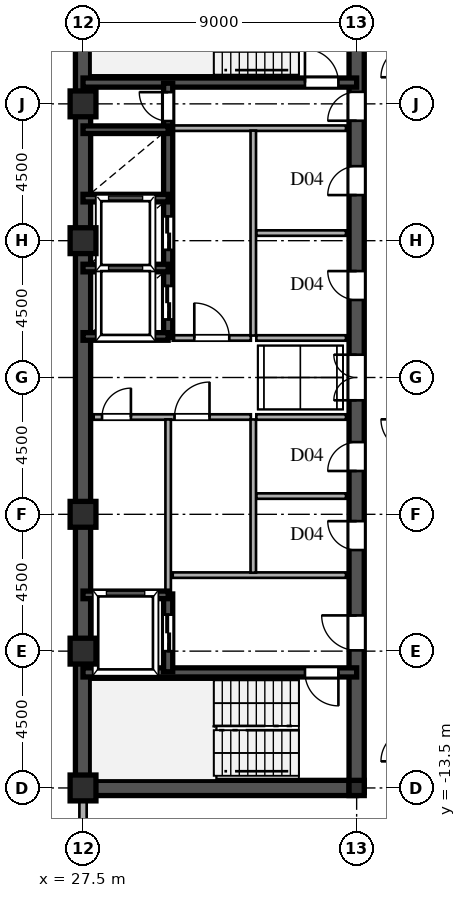
"""IFC4 building model, lengths in metres.
Left out: names, types, materials, properties, quantities, classifications, styles, units other than length and angle.
Written with IfcOpenShell. Run it as: python <this file> out.ifc"""

import sys

from ifc_helpers import new_model, si_unit, direction, frame, frame_2d, origin, origin_2d, place, context, subcontext, project, spatial, rectangle, hollow_rectangle, i_section, extrude, source, transform, mapped, element, fill, save


model = new_model("IFC4")
c1 = context("Model", 3, precision=1e-05, world=origin(), true_north=direction((0.0, 1.0)))
c2 = subcontext(c1, "Body", "Model", "MODEL_VIEW")
j1 = project(units=[si_unit("LENGTHUNIT", "METRE"), si_unit("PLANEANGLEUNIT", "RADIAN")], contexts=[c1])
p1 = place(None, origin())
s1 = spatial("IfcSite", under=j1, at=p1, CompositionType="ELEMENT")
p2 = place(p1, origin())
s2 = spatial("IfcBuilding", under=s1, at=p2, CompositionType="ELEMENT")
p3 = place(p2, frame((0.0, 0.0, 221.1)))
s3 = spatial("IfcBuildingStorey", under=s2, at=p3, CompositionType="ELEMENT", Elevation=221.1)
m1 = source(origin(), c2, "Body", "SweptSolid", [
    extrude(hollow_rectangle(XDim=0.85, YDim=0.85, WallThickness=0.036, at=origin_2d()), origin(), (0.0, 0.0, 1.0), 3.6),
])
for number, where, z_axis, x_axis in (
    (1, (27.5, -13.5, 0.0), (0.0, 0.0, 1.0), (1.0, 0.0, 0.0)),
    (2, (27.5, -9.0, 0.0), (0.0, 0.0, 1.0), (1.0, 0.0, 0.0)),
    (3, (27.5, -4.5, 0.0), (0.0, 0.0, 1.0), (1.0, 0.0, 0.0)),
    (4, (27.5, 4.5, 0.0), (0.0, 0.0, 1.0), (1.0, 0.0, 0.0)),
    (5, (27.5, 9.0, 0.0), (0.0, 0.0, 1.0), (1.0, 0.0, 0.0)),
):
    element("IfcColumn", number, at=place(p3, frame(where, z_axis=z_axis, x_axis=x_axis)), inside=s3, PredefinedType="COLUMN", context=c2, shape_type="MappedRepresentation", body=[
        mapped(m1, transform((0.0, 0.0, 0.0), scale=1.0)),
    ])
m2 = source(origin(), c2, "Body", "SweptSolid", [
    extrude(i_section(OverallWidth=0.5, OverallDepth=0.5, WebThickness=0.02, FlangeThickness=0.032, at=origin_2d()), origin(), (0.0, 0.0, 1.0), 3.6),
])
p4 = place(p3, frame((36.5, -13.5, 0.0), z_axis=(0.0, 0.0, 1.0), x_axis=(1.0, 0.0, 0.0)))
e6 = element("IfcColumn", 6, at=p4, inside=s3, PredefinedType="COLUMN", context=c2, shape_type="MappedRepresentation", body=[
    mapped(m2, transform((0.0, 0.0, 0.0), scale=1.0)),
])
p5 = place(p3, frame((27.5, -15.98, 0.0), z_axis=(0.0, 0.0, 1.0), x_axis=(0.0, 1.0, 0.0)))
e7 = element("IfcWall", 7, at=p5, inside=s3, PredefinedType="SOLIDWALL", context=c2, shape_type="SweptSolid", body=[
    extrude(rectangle(XDim=1.605, YDim=0.24, at=frame_2d((0.803, 0.0))), origin(), (0.0, 0.0, 1.0), 3.34),
])
p6 = place(p3, frame((27.5, -14.375, 0.0), z_axis=(0.0, 0.0, 1.0), x_axis=(0.0, 1.0, 0.0)))
e8 = element("IfcWall", 8, at=p6, inside=s3, PredefinedType="SOLIDWALL", context=c2, shape_type="SweptSolid", body=[
    extrude(rectangle(XDim=0.62, YDim=0.24, at=frame_2d((0.31, 0.0))), origin(), (0.0, 0.0, 1.0), 2.84),
])
for number, where, z_axis, x_axis in (
    (9, (27.5, -13.5, 0.0), (0.0, 0.0, 1.0), (0.0, 1.0, 0.0)),
    (10, (27.5, 1.3, 0.0), (0.0, 0.0, 1.0), (0.0, 1.0, 0.0)),
):
    element("IfcWall", number, at=place(p3, frame(where, z_axis=z_axis, x_axis=x_axis)), inside=s3, PredefinedType="SHEAR", context=c2, shape_type="SweptSolid", body=[
        extrude(rectangle(XDim=12.2, YDim=0.5, at=frame_2d((6.1, 0.0))), origin(), (0.0, 0.0, 1.0), 3.34),
    ])
p7 = place(p3, frame((27.5, -1.3, 0.0), z_axis=(0.0, 0.0, 1.0), x_axis=(0.0, 1.0, 0.0)))
e11 = element("IfcWall", 11, at=p7, inside=s3, PredefinedType="SHEAR", context=c2, shape_type="SweptSolid", body=[
    extrude(rectangle(XDim=2.6, YDim=0.5, at=frame_2d((1.3, 0.0))), origin(), (0.0, 0.0, 1.0), 3.34),
])
p8 = place(p3, frame((27.5, -13.5, 0.0), z_axis=(0.0, 0.0, 1.0), x_axis=(1.0, 0.0, 0.0)))
e12 = element("IfcWall", 12, at=p8, inside=s3, PredefinedType="SHEAR", context=c2, shape_type="SweptSolid", body=[
    extrude(rectangle(XDim=9.0, YDim=0.5, at=frame_2d((4.5, 0.0))), origin(), (0.0, 0.0, 1.0), 3.34),
])
p9 = place(p3, frame((36.5, -13.65, 0.0), z_axis=(0.0, 0.0, 1.0), x_axis=(0.0, 1.0, 0.0)))
e13 = element("IfcWall", 13, at=p9, inside=s3, PredefinedType="SHEAR", context=c2, shape_type="SweptSolid", body=[
    extrude(rectangle(XDim=7.15, YDim=0.5, at=frame_2d((3.575, 0.0))), origin(), (0.0, 0.0, 1.0), 3.34),
])
p10 = place(p9, frame((4.675, 0.0, 0.0)))
e14 = element("IfcOpeningElement", 14, at=p10, cuts=e13, PredefinedType="OPENING", context=c2, shape_type="SweptSolid", body=[
    extrude(rectangle(XDim=1.15, YDim=2.2, at=frame_2d((0.575, 1.1))), frame((0.0, 0.26, 0.0), z_axis=(0.0, -1.0, 0.0), x_axis=(1.0, 0.0, 0.0)), (0.0, 0.0, 1.0), 0.52),
])
p11 = place(p3, frame((36.5, -1.3, 0.0), z_axis=(0.0, 0.0, 1.0), x_axis=(0.0, 1.0, 0.0)))
e15 = element("IfcWall", 15, at=p11, inside=s3, PredefinedType="SHEAR", context=c2, shape_type="SweptSolid", body=[
    extrude(rectangle(XDim=2.6, YDim=0.5, at=frame_2d((1.3, 0.0))), origin(), (0.0, 0.0, 1.0), 3.34),
])
p12 = place(p11, frame((0.55, 0.0, 0.0)))
e16 = element("IfcOpeningElement", 16, at=p12, cuts=e15, PredefinedType="OPENING", context=c2, shape_type="SweptSolid", body=[
    extrude(rectangle(XDim=1.5, YDim=2.3, at=frame_2d((0.75, 1.15))), frame((0.0, 0.26, 0.0), z_axis=(0.0, -1.0, 0.0), x_axis=(1.0, 0.0, 0.0)), (0.0, 0.0, 1.0), 0.52),
])
p13 = place(p3, frame((36.5, 8.2, 0.0), z_axis=(0.0, 0.0, 1.0), x_axis=(0.0, 1.0, 0.0)))
e17 = element("IfcWall", 17, at=p13, inside=s3, PredefinedType="SHEAR", context=c2, shape_type="SweptSolid", body=[
    extrude(rectangle(XDim=5.45, YDim=0.5, at=frame_2d((2.725, 0.0))), origin(), (0.0, 0.0, 1.0), 3.34),
])
p14 = place(p13, frame((0.245, 0.0, 0.0)))
e18 = element("IfcOpeningElement", 18, at=p14, cuts=e17, PredefinedType="OPENING", context=c2, shape_type="SweptSolid", body=[
    extrude(rectangle(XDim=0.95, YDim=2.15, at=frame_2d((0.475, 1.075))), frame((0.0, 0.26, 0.0), z_axis=(0.0, -1.0, 0.0), x_axis=(1.0, 0.0, 0.0)), (0.0, 0.0, 1.0), 0.52),
])
p15 = place(p3, frame((36.5, -6.5, 0.0), z_axis=(0.0, 0.0, 1.0), x_axis=(0.0, 1.0, 0.0)))
e19 = element("IfcWall", 19, at=p15, inside=s3, PredefinedType="SHEAR", context=c2, shape_type="SweptSolid", body=[
    extrude(rectangle(XDim=2.6, YDim=0.5, at=frame_2d((1.3, 0.0))), origin(), (0.0, 0.0, 1.0), 3.34),
])
p16 = place(p15, frame((0.825, 0.0, 0.0)))
e20 = element("IfcOpeningElement", 20, at=p16, cuts=e19, PredefinedType="OPENING", context=c2, shape_type="SweptSolid", body=[
    extrude(rectangle(XDim=0.95, YDim=2.15, at=frame_2d((0.475, 1.075))), frame((0.0, 0.26, 0.0), z_axis=(0.0, -1.0, 0.0), x_axis=(1.0, 0.0, 0.0)), (0.0, 0.0, 1.0), 0.52),
])
p17 = place(p3, frame((36.5, -3.9, 0.0), z_axis=(0.0, 0.0, 1.0), x_axis=(0.0, 1.0, 0.0)))
e21 = element("IfcWall", 21, at=p17, inside=s3, PredefinedType="SHEAR", context=c2, shape_type="SweptSolid", body=[
    extrude(rectangle(XDim=2.6, YDim=0.5, at=frame_2d((1.3, 0.0))), origin(), (0.0, 0.0, 1.0), 3.34),
])
p18 = place(p17, frame((0.825, 0.0, 0.0)))
e22 = element("IfcOpeningElement", 22, at=p18, cuts=e21, PredefinedType="OPENING", context=c2, shape_type="SweptSolid", body=[
    extrude(rectangle(XDim=0.95, YDim=2.15, at=frame_2d((0.475, 1.075))), frame((0.0, 0.26, 0.0), z_axis=(0.0, -1.0, 0.0), x_axis=(1.0, 0.0, 0.0)), (0.0, 0.0, 1.0), 0.52),
])
p19 = place(p3, frame((36.5, 1.3, 0.0), z_axis=(0.0, 0.0, 1.0), x_axis=(0.0, 1.0, 0.0)))
e23 = element("IfcWall", 23, at=p19, inside=s3, PredefinedType="SHEAR", context=c2, shape_type="SweptSolid", body=[
    extrude(rectangle(XDim=3.45, YDim=0.5, at=frame_2d((1.725, 0.0))), origin(), (0.0, 0.0, 1.0), 3.34),
])
p20 = place(p19, frame((1.25, 0.0, 0.0)))
e24 = element("IfcOpeningElement", 24, at=p20, cuts=e23, PredefinedType="OPENING", context=c2, shape_type="SweptSolid", body=[
    extrude(rectangle(XDim=0.95, YDim=2.15, at=frame_2d((0.475, 1.075))), frame((0.0, 0.26, 0.0), z_axis=(0.0, -1.0, 0.0), x_axis=(1.0, 0.0, 0.0)), (0.0, 0.0, 1.0), 0.52),
])
p21 = place(p3, frame((36.5, 4.75, 0.0), z_axis=(0.0, 0.0, 1.0), x_axis=(0.0, 1.0, 0.0)))
e25 = element("IfcWall", 25, at=p21, inside=s3, PredefinedType="SHEAR", context=c2, shape_type="SweptSolid", body=[
    extrude(rectangle(XDim=3.45, YDim=0.5, at=frame_2d((1.725, 0.0))), origin(), (0.0, 0.0, 1.0), 3.34),
])
p22 = place(p21, frame((1.25, 0.0, 0.0)))
e26 = element("IfcOpeningElement", 26, at=p22, cuts=e25, PredefinedType="OPENING", context=c2, shape_type="SweptSolid", body=[
    extrude(rectangle(XDim=0.95, YDim=2.15, at=frame_2d((0.475, 1.075))), frame((0.0, 0.26, 0.0), z_axis=(0.0, -1.0, 0.0), x_axis=(1.0, 0.0, 0.0)), (0.0, 0.0, 1.0), 0.52),
])
p23 = place(p3, frame((27.5, -9.7, 0.0), z_axis=(0.0, 0.0, 1.0), x_axis=(1.0, 0.0, 0.0)))
e27 = element("IfcWall", 27, at=p23, inside=s3, PredefinedType="SHEAR", context=c2, shape_type="SweptSolid", body=[
    extrude(rectangle(XDim=9.0, YDim=0.3, at=frame_2d((4.5, 0.0))), origin(), (0.0, 0.0, 1.0), 3.34),
])
p24 = place(p23, frame((7.3, 0.0, 0.0)))
e28 = element("IfcOpeningElement", 28, at=p24, cuts=e27, PredefinedType="OPENING", context=c2, shape_type="SweptSolid", body=[
    extrude(rectangle(XDim=1.1, YDim=2.2, at=frame_2d((0.55, 1.1))), frame((0.0, 0.16, 0.0), z_axis=(0.0, -1.0, 0.0), x_axis=(1.0, 0.0, 0.0)), (0.0, 0.0, 1.0), 0.32),
])
p25 = place(p3, frame((27.5, 9.7, 0.0), z_axis=(0.0, 0.0, 1.0), x_axis=(1.0, 0.0, 0.0)))
e29 = element("IfcWall", 29, at=p25, inside=s3, PredefinedType="SHEAR", context=c2, shape_type="SweptSolid", body=[
    extrude(rectangle(XDim=9.0, YDim=0.3, at=frame_2d((4.5, 0.0))), origin(), (0.0, 0.0, 1.0), 3.34),
])
p26 = place(p25, frame((7.3, 0.0, 0.0)))
e30 = element("IfcOpeningElement", 30, at=p26, cuts=e29, PredefinedType="OPENING", context=c2, shape_type="SweptSolid", body=[
    extrude(rectangle(XDim=1.1, YDim=2.2, at=frame_2d((0.55, 1.1))), frame((0.0, 0.16, 0.0), z_axis=(0.0, -1.0, 0.0), x_axis=(1.0, 0.0, 0.0)), (0.0, 0.0, 1.0), 0.32),
])
for number, where, z_axis, x_axis in (
    (31, (27.5, -7.15, 0.0), (0.0, 0.0, 1.0), (1.0, 0.0, 0.0)),
    (32, (27.5, 1.35, 0.0), (0.0, 0.0, 1.0), (1.0, 0.0, 0.0)),
    (33, (27.5, 3.6, 0.0), (0.0, 0.0, 1.0), (1.0, 0.0, 0.0)),
    (34, (27.5, 5.9, 0.0), (0.0, 0.0, 1.0), (1.0, 0.0, 0.0)),
    (35, (27.5, 8.15, 0.0), (0.0, 0.0, 1.0), (1.0, 0.0, 0.0)),
):
    element("IfcWall", number, at=place(p3, frame(where, z_axis=z_axis, x_axis=x_axis)), inside=s3, PredefinedType="SHEAR", context=c2, shape_type="SweptSolid", body=[
        extrude(rectangle(XDim=2.8, YDim=0.25, at=frame_2d((1.4, 0.0))), origin(), (0.0, 0.0, 1.0), 3.34),
    ])
p27 = place(p3, frame((30.3, -9.68, 0.0), z_axis=(0.0, 0.0, 1.0), x_axis=(0.0, 1.0, 0.0)))
e36 = element("IfcWall", 36, at=p27, inside=s3, PredefinedType="SHEAR", context=c2, shape_type="SweptSolid", body=[
    extrude(rectangle(XDim=2.56, YDim=0.3, at=frame_2d((1.28, 0.0))), origin(), (0.0, 0.0, 1.0), 3.34),
])
p28 = place(p27, frame((0.68, 0.0, 0.0)))
e37 = element("IfcOpeningElement", 37, at=p28, cuts=e36, PredefinedType="OPENING", context=c2, shape_type="SweptSolid", body=[
    extrude(rectangle(XDim=1.2, YDim=2.25, at=frame_2d((0.6, 1.125))), frame((0.0, 0.16, 0.0), z_axis=(0.0, -1.0, 0.0), x_axis=(1.0, 0.0, 0.0)), (0.0, 0.0, 1.0), 0.32),
])
p29 = place(p3, frame((30.3, 1.32, 0.0), z_axis=(0.0, 0.0, 1.0), x_axis=(0.0, 1.0, 0.0)))
e38 = element("IfcWall", 38, at=p29, inside=s3, PredefinedType="SHEAR", context=c2, shape_type="SweptSolid", body=[
    extrude(rectangle(XDim=2.28, YDim=0.3, at=frame_2d((1.14, 0.0))), origin(), (0.0, 0.0, 1.0), 3.34),
])
p30 = place(p29, frame((0.59, 0.0, 0.0)))
e39 = element("IfcOpeningElement", 39, at=p30, cuts=e38, PredefinedType="OPENING", context=c2, shape_type="SweptSolid", body=[
    extrude(rectangle(XDim=1.1, YDim=2.2, at=frame_2d((0.55, 1.1))), frame((0.0, 0.16, 0.0), z_axis=(0.0, -1.0, 0.0), x_axis=(1.0, 0.0, 0.0)), (0.0, 0.0, 1.0), 0.32),
])
p31 = place(p3, frame((30.3, 3.6, 0.0), z_axis=(0.0, 0.0, 1.0), x_axis=(0.0, 1.0, 0.0)))
e40 = element("IfcWall", 40, at=p31, inside=s3, PredefinedType="SHEAR", context=c2, shape_type="SweptSolid", body=[
    extrude(rectangle(XDim=2.3, YDim=0.3, at=frame_2d((1.15, 0.0))), origin(), (0.0, 0.0, 1.0), 3.34),
])
p32 = place(p31, frame((0.6, 0.0, 0.0)))
e41 = element("IfcOpeningElement", 41, at=p32, cuts=e40, PredefinedType="OPENING", context=c2, shape_type="SweptSolid", body=[
    extrude(rectangle(XDim=1.1, YDim=2.2, at=frame_2d((0.55, 1.1))), frame((0.0, 0.16, 0.0), z_axis=(0.0, -1.0, 0.0), x_axis=(1.0, 0.0, 0.0)), (0.0, 0.0, 1.0), 0.32),
])
p33 = place(p3, frame((30.3, 5.9, 0.0), z_axis=(0.0, 0.0, 1.0), x_axis=(0.0, 1.0, 0.0)))
e42 = element("IfcWall", 42, at=p33, inside=s3, PredefinedType="SHEAR", context=c2, shape_type="SweptSolid", body=[
    extrude(rectangle(XDim=2.25, YDim=0.3, at=frame_2d((1.125, 0.0))), origin(), (0.0, 0.0, 1.0), 3.34),
])
p34 = place(p3, frame((30.3, 8.15, 0.0), z_axis=(0.0, 0.0, 1.0), x_axis=(0.0, 1.0, 0.0)))
e43 = element("IfcWall", 43, at=p34, inside=s3, PredefinedType="SHEAR", context=c2, shape_type="SweptSolid", body=[
    extrude(rectangle(XDim=1.53, YDim=0.3, at=frame_2d((0.765, 0.0))), origin(), (0.0, 0.0, 1.0), 3.34),
])
p35 = place(p34, frame((0.285, 0.0, 0.0)))
e44 = element("IfcOpeningElement", 44, at=p35, cuts=e43, PredefinedType="OPENING", context=c2, shape_type="SweptSolid", body=[
    extrude(rectangle(XDim=0.95, YDim=2.15, at=frame_2d((0.475, 1.075))), frame((0.0, 0.16, 0.0), z_axis=(0.0, -1.0, 0.0), x_axis=(1.0, 0.0, 0.0)), (0.0, 0.0, 1.0), 0.32),
])
for number, where, z_axis, x_axis in (
    (45, (30.45, -6.5, 0.0), (0.0, 0.0, 1.0), (1.0, 0.0, 0.0)),
    (46, (30.45, 8.2, 0.0), (0.0, 0.0, 1.0), (1.0, 0.0, 0.0)),
):
    element("IfcWall", number, at=place(p3, frame(where, z_axis=z_axis, x_axis=x_axis)), inside=s3, PredefinedType="PARTITIONING", context=c2, shape_type="SweptSolid", body=[
        extrude(rectangle(XDim=5.7, YDim=0.18, at=frame_2d((2.85, 0.0))), origin(), (0.0, 0.0, 1.0), 3.34),
    ])
p36 = place(p3, frame((33.1, -6.42, 0.0), z_axis=(0.0, 0.0, 1.0), x_axis=(0.0, 1.0, 0.0)))
e47 = element("IfcWall", 47, at=p36, inside=s3, PredefinedType="PARTITIONING", context=c2, shape_type="SweptSolid", body=[
    extrude(rectangle(XDim=5.04, YDim=0.18, at=frame_2d((2.52, 0.0))), origin(), (0.0, 0.0, 1.0), 3.34),
])
p37 = place(p3, frame((33.1, 1.38, 0.0), z_axis=(0.0, 0.0, 1.0), x_axis=(0.0, 1.0, 0.0)))
e48 = element("IfcWall", 48, at=p37, inside=s3, PredefinedType="PARTITIONING", context=c2, shape_type="SweptSolid", body=[
    extrude(rectangle(XDim=6.74, YDim=0.18, at=frame_2d((3.37, 0.0))), origin(), (0.0, 0.0, 1.0), 3.34),
])
p38 = place(p3, frame((27.85, -1.3, 0.0), z_axis=(0.0, 0.0, 1.0), x_axis=(1.0, 0.0, 0.0)))
e49 = element("IfcWall", 49, at=p38, inside=s3, PredefinedType="PARTITIONING", context=c2, shape_type="SweptSolid", body=[
    extrude(rectangle(XDim=2.45, YDim=0.18, at=frame_2d((1.225, 0.0))), origin(), (0.0, 0.0, 1.0), 3.34),
])
p39 = place(p38, frame((0.275, 0.0, 0.0)))
e50 = element("IfcOpeningElement", 50, at=p39, cuts=e49, PredefinedType="OPENING", context=c2, shape_type="SweptSolid", body=[
    extrude(rectangle(XDim=0.95, YDim=2.15, at=frame_2d((0.475, 1.075))), frame((0.0, 0.1, 0.0), z_axis=(0.0, -1.0, 0.0), x_axis=(1.0, 0.0, 0.0)), (0.0, 0.0, 1.0), 0.2),
])
p40 = place(p3, frame((30.3, -1.3, 0.0), z_axis=(0.0, 0.0, 1.0), x_axis=(1.0, 0.0, 0.0)))
e51 = element("IfcWall", 51, at=p40, inside=s3, PredefinedType="PARTITIONING", context=c2, shape_type="SweptSolid", body=[
    extrude(rectangle(XDim=2.72, YDim=0.18, at=frame_2d((1.36, 0.0))), origin(), (0.0, 0.0, 1.0), 3.34),
])
p41 = place(p40, frame((0.21, 0.0, 0.0)))
e52 = element("IfcOpeningElement", 52, at=p41, cuts=e51, PredefinedType="OPENING", context=c2, shape_type="SweptSolid", body=[
    extrude(rectangle(XDim=1.15, YDim=2.2, at=frame_2d((0.575, 1.1))), frame((0.0, 0.1, 0.0), z_axis=(0.0, -1.0, 0.0), x_axis=(1.0, 0.0, 0.0)), (0.0, 0.0, 1.0), 0.2),
])
p42 = place(p3, frame((30.3, -7.12, 0.0), z_axis=(0.0, 0.0, 1.0), x_axis=(0.0, 1.0, 0.0)))
e53 = element("IfcWall", 53, at=p42, inside=s3, PredefinedType="PARTITIONING", context=c2, shape_type="SweptSolid", body=[
    extrude(rectangle(XDim=5.74, YDim=0.18, at=frame_2d((2.87, 0.0))), origin(), (0.0, 0.0, 1.0), 3.34),
])
p43 = place(p3, frame((30.45, 1.3, 0.0), z_axis=(0.0, 0.0, 1.0), x_axis=(1.0, 0.0, 0.0)))
e54 = element("IfcWall", 54, at=p43, inside=s3, PredefinedType="PARTITIONING", context=c2, shape_type="SweptSolid", body=[
    extrude(rectangle(XDim=2.57, YDim=0.18, at=frame_2d((1.285, 0.0))), origin(), (0.0, 0.0, 1.0), 3.34),
])
p44 = place(p43, frame((0.71, 0.0, 0.0)))
e55 = element("IfcOpeningElement", 55, at=p44, cuts=e54, PredefinedType="OPENING", context=c2, shape_type="SweptSolid", body=[
    extrude(rectangle(XDim=1.15, YDim=2.2, at=frame_2d((0.575, 1.1))), frame((0.0, 0.1, 0.0), z_axis=(0.0, -1.0, 0.0), x_axis=(1.0, 0.0, 0.0)), (0.0, 0.0, 1.0), 0.2),
])
for number, where, z_axis, x_axis in (
    (56, (33.2, -1.3, 0.0), (0.0, 0.0, 1.0), (1.0, 0.0, 0.0)),
    (57, (33.2, 1.3, 0.0), (0.0, 0.0, 1.0), (1.0, 0.0, 0.0)),
    (58, (33.2, -3.9, 0.0), (0.0, 0.0, 1.0), (1.0, 0.0, 0.0)),
    (59, (33.2, 4.75, 0.0), (0.0, 0.0, 1.0), (1.0, 0.0, 0.0)),
):
    element("IfcWall", number, at=place(p3, frame(where, z_axis=z_axis, x_axis=x_axis)), inside=s3, PredefinedType="PARTITIONING", context=c2, shape_type="SweptSolid", body=[
        extrude(rectangle(XDim=2.95, YDim=0.18, at=frame_2d((1.475, 0.0))), origin(), (0.0, 0.0, 1.0), 3.34),
    ])
m3 = source(origin(), c2, "Body", "SweptSolid", [
    extrude(rectangle(XDim=1.15, YDim=2.2, at=frame_2d((0.575, 1.1))), frame((0.0, 0.025, 0.0), z_axis=(0.0, -1.0, 0.0), x_axis=(1.0, 0.0, 0.0)), (0.0, 0.0, 1.0), 0.05),
])
p45 = place(p10, origin())
e60 = element("IfcDoor", 60, at=p45, inside=s3, OperationType="SINGLE_SWING_RIGHT", PredefinedType="DOOR", context=c2, shape_type="MappedRepresentation", body=[
    mapped(m3, transform((0.0, 0.0, 0.0), scale=1.0)),
])
fill(e14, e60)
m4 = source(origin(), c2, "Body", "SweptSolid", [
    extrude(rectangle(XDim=1.5, YDim=2.3, at=frame_2d((0.75, 1.15))), frame((0.0, 0.025, 0.0), z_axis=(0.0, -1.0, 0.0), x_axis=(1.0, 0.0, 0.0)), (0.0, 0.0, 1.0), 0.05),
])
p46 = place(p12, origin())
e61 = element("IfcDoor", 61, at=p46, inside=s3, OperationType="DOUBLE_SWING_LEFT", PredefinedType="DOOR", context=c2, shape_type="MappedRepresentation", body=[
    mapped(m4, transform((0.0, 0.0, 0.0), scale=1.0)),
])
fill(e16, e61)
m5 = source(origin(), c2, "Body", "SweptSolid", [
    extrude(rectangle(XDim=0.95, YDim=2.15, at=frame_2d((0.475, 1.075))), frame((0.0, 0.025, 0.0), z_axis=(0.0, -1.0, 0.0), x_axis=(1.0, 0.0, 0.0)), (0.0, 0.0, 1.0), 0.05),
])
p47 = place(p14, origin())
e62 = element("IfcDoor", 62, at=p47, inside=s3, OperationType="SINGLE_SWING_LEFT", PredefinedType="DOOR", context=c2, shape_type="MappedRepresentation", body=[
    mapped(m5, transform((0.0, 0.0, 0.0), scale=1.0)),
])
fill(e18, e62)
p48 = place(p16, origin())
e63 = element("IfcDoor", 63, at=p48, inside=s3, OperationType="SINGLE_SWING_RIGHT", PredefinedType="DOOR", context=c2, shape_type="MappedRepresentation", body=[
    mapped(m5, transform((0.0, 0.0, 0.0), scale=1.0)),
])
fill(e20, e63)
p49 = place(p18, origin())
e64 = element("IfcDoor", 64, at=p49, inside=s3, OperationType="SINGLE_SWING_LEFT", PredefinedType="DOOR", context=c2, shape_type="MappedRepresentation", body=[
    mapped(m5, transform((0.0, 0.0, 0.0), scale=1.0)),
])
fill(e22, e64)
p50 = place(p20, origin())
e65 = element("IfcDoor", 65, at=p50, inside=s3, OperationType="SINGLE_SWING_RIGHT", PredefinedType="DOOR", context=c2, shape_type="MappedRepresentation", body=[
    mapped(m5, transform((0.0, 0.0, 0.0), scale=1.0)),
])
fill(e24, e65)
p51 = place(p22, origin())
e66 = element("IfcDoor", 66, at=p51, inside=s3, OperationType="SINGLE_SWING_LEFT", PredefinedType="DOOR", context=c2, shape_type="MappedRepresentation", body=[
    mapped(m5, transform((0.0, 0.0, 0.0), scale=1.0)),
])
fill(e26, e66)
m6 = source(origin(), c2, "Body", "SweptSolid", [
    extrude(rectangle(XDim=1.1, YDim=2.2, at=frame_2d((0.55, 1.1))), frame((0.0, 0.025, 0.0), z_axis=(0.0, -1.0, 0.0), x_axis=(1.0, 0.0, 0.0)), (0.0, 0.0, 1.0), 0.05),
])
p52 = place(p24, frame((1.1, 0.0, 0.0), z_axis=(0.0, 0.0, 1.0), x_axis=(-1.0, 0.0, 0.0)))
e67 = element("IfcDoor", 67, at=p52, inside=s3, OperationType="SINGLE_SWING_RIGHT", PredefinedType="DOOR", context=c2, shape_type="MappedRepresentation", body=[
    mapped(m6, transform((0.0, 0.0, 0.0), scale=1.0)),
])
fill(e28, e67)
p53 = place(p26, origin())
e68 = element("IfcDoor", 68, at=p53, inside=s3, OperationType="SINGLE_SWING_LEFT", PredefinedType="DOOR", context=c2, shape_type="MappedRepresentation", body=[
    mapped(m6, transform((0.0, 0.0, 0.0), scale=1.0)),
])
fill(e30, e68)
m7 = source(origin(), c2, "Body", "SweptSolid", [
    extrude(rectangle(XDim=1.2, YDim=2.25, at=frame_2d((0.6, 1.125))), frame((0.0, 0.025, 0.0), z_axis=(0.0, -1.0, 0.0), x_axis=(1.0, 0.0, 0.0)), (0.0, 0.0, 1.0), 0.05),
])
p54 = place(p28, origin())
e69 = element("IfcDoor", 69, at=p54, inside=s3, OperationType="DOUBLE_DOOR_SLIDING", PredefinedType="DOOR", context=c2, shape_type="MappedRepresentation", body=[
    mapped(m7, transform((0.0, 0.0, 0.0), scale=1.0)),
])
fill(e37, e69)
m8 = source(origin(), c2, "Body", "SweptSolid", [
    extrude(rectangle(XDim=1.1, YDim=2.2, at=frame_2d((0.55, 1.1))), frame((0.0, 0.025, 0.0), z_axis=(0.0, -1.0, 0.0), x_axis=(1.0, 0.0, 0.0)), (0.0, 0.0, 1.0), 0.05),
])
p55 = place(p30, origin())
e70 = element("IfcDoor", 70, at=p55, inside=s3, OperationType="DOUBLE_DOOR_SLIDING", PredefinedType="DOOR", context=c2, shape_type="MappedRepresentation", body=[
    mapped(m8, transform((0.0, 0.0, 0.0), scale=1.0)),
])
fill(e39, e70)
p56 = place(p32, origin())
e71 = element("IfcDoor", 71, at=p56, inside=s3, OperationType="DOUBLE_DOOR_SLIDING", PredefinedType="DOOR", context=c2, shape_type="MappedRepresentation", body=[
    mapped(m8, transform((0.0, 0.0, 0.0), scale=1.0)),
])
fill(e41, e71)
p57 = place(p35, origin())
e72 = element("IfcDoor", 72, at=p57, inside=s3, OperationType="SINGLE_SWING_RIGHT", PredefinedType="DOOR", context=c2, shape_type="MappedRepresentation", body=[
    mapped(m5, transform((0.0, 0.0, 0.0), scale=1.0)),
])
fill(e44, e72)
p58 = place(p39, origin())
e73 = element("IfcDoor", 73, at=p58, inside=s3, OperationType="SINGLE_SWING_RIGHT", PredefinedType="DOOR", context=c2, shape_type="MappedRepresentation", body=[
    mapped(m5, transform((0.0, 0.0, 0.0), scale=1.0)),
])
fill(e50, e73)
p59 = place(p41, origin())
e74 = element("IfcDoor", 74, at=p59, inside=s3, OperationType="SINGLE_SWING_RIGHT", PredefinedType="DOOR", context=c2, shape_type="MappedRepresentation", body=[
    mapped(m3, transform((0.0, 0.0, 0.0), scale=1.0)),
])
fill(e52, e74)
p60 = place(p44, origin())
e75 = element("IfcDoor", 75, at=p60, inside=s3, OperationType="SINGLE_SWING_LEFT", PredefinedType="DOOR", context=c2, shape_type="MappedRepresentation", body=[
    mapped(m3, transform((0.0, 0.0, 0.0), scale=1.0)),
])
fill(e55, e75)
save(model, sys.argv[1])
